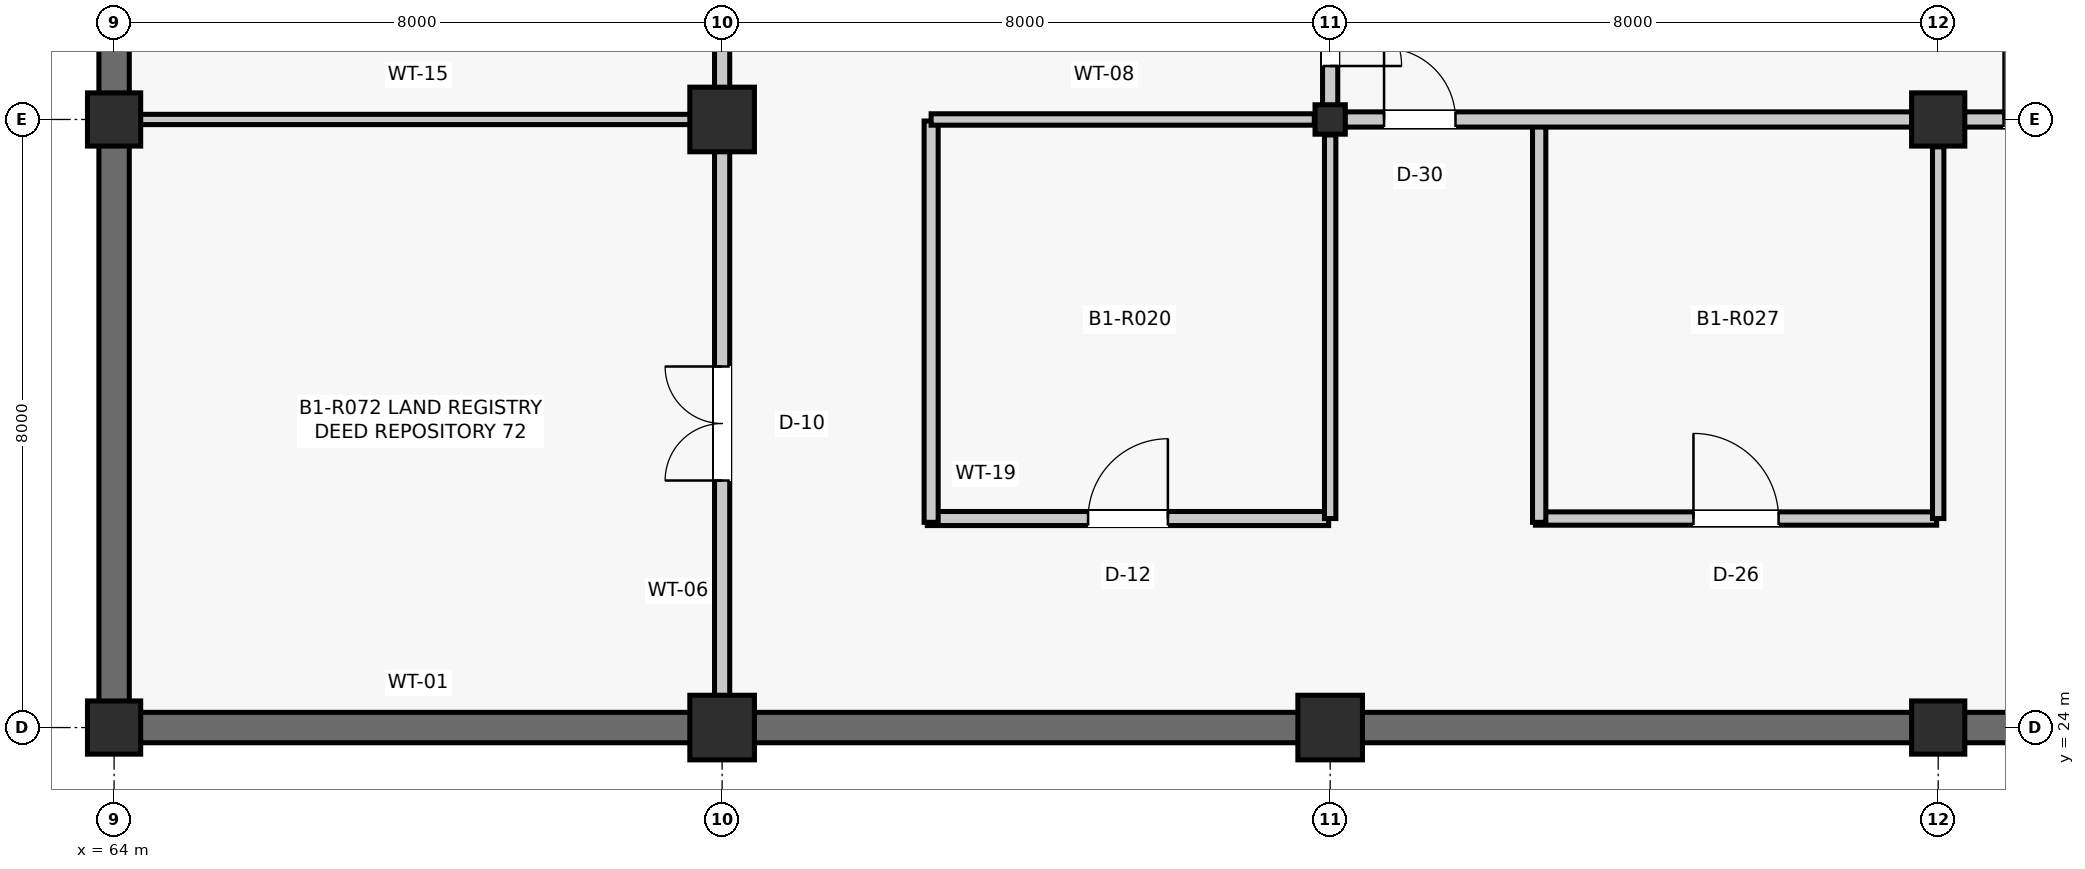
"""IFC4 building model, lengths in metres.
Left out: names, types, materials, properties, quantities, classifications, styles, units other than length and angle.
Written with IfcOpenShell. Run it as: python <this file> out.ifc"""

import sys

from ifc_helpers import new_model, si_unit, direction, frame, frame_2d, origin, origin_2d, place, context, subcontext, project, spatial, rectangle, i_section, extrude, element, fill, save


model = new_model("IFC4")
c1 = context("Model", 3, precision=1e-05, world=origin(), true_north=direction((0.0, 1.0)))
c2 = subcontext(c1, "Body", "Model", "MODEL_VIEW")
j1 = project(units=[si_unit("LENGTHUNIT", "METRE"), si_unit("PLANEANGLEUNIT", "RADIAN")], contexts=[c1])
p1 = place(None, origin())
s1 = spatial("IfcSite", under=j1, at=p1, CompositionType="ELEMENT")
p2 = place(p1, origin())
s2 = spatial("IfcBuilding", under=s1, at=p2, CompositionType="ELEMENT")
p3 = place(p2, frame((0.0, 0.0, -4.29)))
s3 = spatial("IfcBuildingStorey", under=s2, at=p3, CompositionType="ELEMENT", Elevation=-4.29)
for number, where, z_axis, x_axis in (
    (1, (64.0, 24.0, 0.0), (0.0, 0.0, 1.0), (1.0, 0.0, 0.0)),
    (2, (64.0, 32.0, 0.0), (0.0, 0.0, 1.0), (1.0, 0.0, 0.0)),
):
    element("IfcColumn", number, at=place(p3, frame(where, z_axis=z_axis, x_axis=x_axis)), inside=s3, PredefinedType="COLUMN", context=c2, shape_type="SweptSolid", body=[
        extrude(rectangle(XDim=0.7, YDim=0.7, at=origin_2d()), origin(), (0.0, 0.0, 1.0), 4.29),
    ])
for number, where, z_axis, x_axis in (
    (3, (72.0, 24.0, 0.0), (0.0, 0.0, 1.0), (1.0, 0.0, 0.0)),
    (4, (72.0, 32.0, 0.0), (0.0, 0.0, 1.0), (1.0, 0.0, 0.0)),
    (5, (80.0, 24.0, 0.0), (0.0, 0.0, 1.0), (1.0, 0.0, 0.0)),
):
    element("IfcColumn", number, at=place(p3, frame(where, z_axis=z_axis, x_axis=x_axis)), inside=s3, PredefinedType="COLUMN", context=c2, shape_type="SweptSolid", body=[
        extrude(rectangle(XDim=0.85, YDim=0.85, at=origin_2d()), origin(), (0.0, 0.0, 1.0), 4.29),
    ])
p4 = place(p3, frame((80.0, 32.0, 0.0), z_axis=(0.0, 0.0, 1.0), x_axis=(1.0, 0.0, 0.0)))
e6 = element("IfcColumn", 6, at=p4, inside=s3, PredefinedType="COLUMN", context=c2, shape_type="SweptSolid", body=[
    extrude(i_section(OverallWidth=0.398, OverallDepth=0.387, WebThickness=0.021, FlangeThickness=0.033, FilletRadius=0.015, at=origin_2d()), origin(), (0.0, 0.0, 1.0), 4.29),
])
for number, where, z_axis, x_axis in (
    (7, (88.0, 24.0, 0.0), (0.0, 0.0, 1.0), (1.0, 0.0, 0.0)),
    (8, (88.0, 32.0, 0.0), (0.0, 0.0, 1.0), (1.0, 0.0, 0.0)),
):
    element("IfcColumn", number, at=place(p3, frame(where, z_axis=z_axis, x_axis=x_axis)), inside=s3, PredefinedType="COLUMN", context=c2, shape_type="SweptSolid", body=[
        extrude(rectangle(XDim=0.7, YDim=0.7, at=origin_2d()), origin(), (0.0, 0.0, 1.0), 4.29),
    ])
p5 = place(p3, frame((64.335, 24.0, 0.0), z_axis=(0.0, 0.0, 1.0), x_axis=(1.0, 0.0, 0.0)))
e9 = element("IfcWall", 9, at=p5, inside=s3, PredefinedType="SHEAR", context=c2, shape_type="SweptSolid", body=[
    extrude(rectangle(XDim=7.255, YDim=0.4, at=frame_2d((3.627, 0.0))), origin(), (0.0, 0.0, 1.0), 3.401),
])
p6 = place(p3, frame((64.0, 24.335, 0.0), z_axis=(0.0, 0.0, 1.0), x_axis=(0.0, 1.0, 0.0)))
e10 = element("IfcWall", 10, at=p6, inside=s3, PredefinedType="SHEAR", context=c2, shape_type="SweptSolid", body=[
    extrude(rectangle(XDim=7.33, YDim=0.4, at=frame_2d((3.665, 0.0))), origin(), (0.0, 0.0, 1.0), 3.468),
])
p7 = place(p3, frame((64.0, 32.335, 0.0), z_axis=(0.0, 0.0, 1.0), x_axis=(0.0, 1.0, 0.0)))
e11 = element("IfcWall", 11, at=p7, inside=s3, PredefinedType="SHEAR", context=c2, shape_type="SweptSolid", body=[
    extrude(rectangle(XDim=7.33, YDim=0.4, at=frame_2d((3.665, 0.0))), origin(), (0.0, 0.0, 1.0), 3.4),
])
p8 = place(p3, frame((72.41, 24.0, 0.0), z_axis=(0.0, 0.0, 1.0), x_axis=(1.0, 0.0, 0.0)))
e12 = element("IfcWall", 12, at=p8, inside=s3, PredefinedType="SHEAR", context=c2, shape_type="SweptSolid", body=[
    extrude(rectangle(XDim=7.18, YDim=0.4, at=frame_2d((3.59, 0.0))), origin(), (0.0, 0.0, 1.0), 3.324),
])
p9 = place(p3, frame((80.41, 24.0, 0.0), z_axis=(0.0, 0.0, 1.0), x_axis=(1.0, 0.0, 0.0)))
e13 = element("IfcWall", 13, at=p9, inside=s3, PredefinedType="SHEAR", context=c2, shape_type="SweptSolid", body=[
    extrude(rectangle(XDim=7.255, YDim=0.4, at=frame_2d((3.627, 0.0))), origin(), (0.0, 0.0, 1.0), 3.4),
])
p10 = place(p3, frame((88.335, 24.0, 0.0), z_axis=(0.0, 0.0, 1.0), x_axis=(1.0, 0.0, 0.0)))
e14 = element("IfcWall", 14, at=p10, inside=s3, PredefinedType="SHEAR", context=c2, shape_type="SweptSolid", body=[
    extrude(rectangle(XDim=7.481, YDim=0.4, at=frame_2d((3.74, 0.0))), origin(), (0.0, 0.0, 1.0), 3.333),
])
p11 = place(p3, frame((74.7, 26.75, 0.0), z_axis=(0.0, 0.0, 1.0), x_axis=(1.0, 0.0, 0.0)))
e15 = element("IfcWall", 15, at=p11, inside=s3, PredefinedType="PARTITIONING", context=c2, shape_type="SweptSolid", body=[
    extrude(rectangle(XDim=5.28, YDim=0.185, at=frame_2d((2.64, 0.0))), origin(), (0.0, 0.0, 1.0), 3.402),
])
p12 = place(p11, frame((2.115, 0.0, 0.0)))
e16 = element("IfcOpeningElement", 16, at=p12, cuts=e15, PredefinedType="OPENING", context=c2, shape_type="SweptSolid", body=[
    extrude(rectangle(XDim=1.05, YDim=2.15, at=frame_2d((0.525, 1.075))), frame((0.0, 0.103, 0.0), z_axis=(0.0, -1.0, 0.0), x_axis=(1.0, 0.0, 0.0)), (0.0, 0.0, 1.0), 0.205),
])
p13 = place(p3, frame((74.75, 26.7, 0.0), z_axis=(0.0, 0.0, 1.0), x_axis=(0.0, 1.0, 0.0)))
e17 = element("IfcWall", 17, at=p13, inside=s3, PredefinedType="PARTITIONING", context=c2, shape_type="SweptSolid", body=[
    extrude(rectangle(XDim=5.28, YDim=0.185, at=frame_2d((2.64, 0.0))), origin(), (0.0, 0.0, 1.0), 3.393),
])
p14 = place(p3, frame((74.75, 32.0, 0.0), z_axis=(0.0, 0.0, 1.0), x_axis=(1.0, 0.0, 0.0)))
e18 = element("IfcWall", 18, at=p14, inside=s3, PredefinedType="PARTITIONING", context=c2, shape_type="SweptSolid", body=[
    extrude(rectangle(XDim=5.041, YDim=0.15, at=frame_2d((2.521, 0.0))), origin(), (0.0, 0.0, 1.0), 3.393),
])
p15 = place(p3, frame((80.0, 26.75, 0.0), z_axis=(0.0, 0.0, 1.0), x_axis=(0.0, 1.0, 0.0)))
e19 = element("IfcWall", 19, at=p15, inside=s3, PredefinedType="PARTITIONING", context=c2, shape_type="SweptSolid", body=[
    extrude(rectangle(XDim=5.046, YDim=0.15, at=frame_2d((2.523, 0.0))), origin(), (0.0, 0.0, 1.0), 3.402),
])
p16 = place(p3, frame((82.7, 26.75, 0.0), z_axis=(0.0, 0.0, 1.0), x_axis=(1.0, 0.0, 0.0)))
e20 = element("IfcWall", 20, at=p16, inside=s3, PredefinedType="PARTITIONING", context=c2, shape_type="SweptSolid", body=[
    extrude(rectangle(XDim=5.28, YDim=0.175, at=frame_2d((2.64, 0.0))), origin(), (0.0, 0.0, 1.0), 3.394),
])
p17 = place(p16, frame((2.08, 0.0, 0.0)))
e21 = element("IfcOpeningElement", 21, at=p17, cuts=e20, PredefinedType="OPENING", context=c2, shape_type="SweptSolid", body=[
    extrude(rectangle(XDim=1.12, YDim=2.22, at=frame_2d((0.56, 1.11))), frame((0.0, 0.097, 0.0), z_axis=(0.0, -1.0, 0.0), x_axis=(1.0, 0.0, 0.0)), (0.0, 0.0, 1.0), 0.195),
])
p18 = place(p3, frame((82.75, 26.7, 0.0), z_axis=(0.0, 0.0, 1.0), x_axis=(0.0, 1.0, 0.0)))
e22 = element("IfcWall", 22, at=p18, inside=s3, PredefinedType="PARTITIONING", context=c2, shape_type="SweptSolid", body=[
    extrude(rectangle(XDim=5.28, YDim=0.175, at=frame_2d((2.64, 0.0))), origin(), (0.0, 0.0, 1.0), 3.326),
])
p19 = place(p3, frame((88.0, 26.75, 0.0), z_axis=(0.0, 0.0, 1.0), x_axis=(0.0, 1.0, 0.0)))
e23 = element("IfcWall", 23, at=p19, inside=s3, PredefinedType="PARTITIONING", context=c2, shape_type="SweptSolid", body=[
    extrude(rectangle(XDim=4.89, YDim=0.15, at=frame_2d((2.445, 0.0))), origin(), (0.0, 0.0, 1.0), 3.394),
])
p20 = place(p3, frame((72.0, 24.415, 0.0), z_axis=(0.0, 0.0, 1.0), x_axis=(0.0, 1.0, 0.0)))
e24 = element("IfcWall", 24, at=p20, inside=s3, PredefinedType="PARTITIONING", context=c2, shape_type="SweptSolid", body=[
    extrude(rectangle(XDim=7.17, YDim=0.2, at=frame_2d((3.585, 0.0))), origin(), (0.0, 0.0, 1.0), 3.393),
])
p21 = place(p20, frame((2.835, 0.0, 0.0)))
e25 = element("IfcOpeningElement", 25, at=p21, cuts=e24, PredefinedType="OPENING", context=c2, shape_type="SweptSolid", body=[
    extrude(rectangle(XDim=1.5, YDim=2.25, at=frame_2d((0.75, 1.125))), frame((0.0, 0.11, 0.0), z_axis=(0.0, -1.0, 0.0), x_axis=(1.0, 0.0, 0.0)), (0.0, 0.0, 1.0), 0.22),
])
p22 = place(p3, frame((64.34, 32.0, 0.0), z_axis=(0.0, 0.0, 1.0), x_axis=(1.0, 0.0, 0.0)))
e26 = element("IfcWall", 26, at=p22, inside=s3, PredefinedType="PARTITIONING", context=c2, shape_type="SweptSolid", body=[
    extrude(rectangle(XDim=7.245, YDim=0.135, at=frame_2d((3.623, 0.0))), origin(), (0.0, 0.0, 1.0), 3.317),
])
p23 = place(p3, frame((72.0, 32.415, 0.0), z_axis=(0.0, 0.0, 1.0), x_axis=(0.0, 1.0, 0.0)))
e27 = element("IfcWall", 27, at=p23, inside=s3, PredefinedType="PARTITIONING", context=c2, shape_type="SweptSolid", body=[
    extrude(rectangle(XDim=7.17, YDim=0.2, at=frame_2d((3.585, 0.0))), origin(), (0.0, 0.0, 1.0), 3.402),
])
p24 = place(p23, frame((2.835, 0.0, 0.0)))
e28 = element("IfcOpeningElement", 28, at=p24, cuts=e27, PredefinedType="OPENING", context=c2, shape_type="SweptSolid", body=[
    extrude(rectangle(XDim=1.5, YDim=2.25, at=frame_2d((0.75, 1.125))), frame((0.0, 0.11, 0.0), z_axis=(0.0, -1.0, 0.0), x_axis=(1.0, 0.0, 0.0)), (0.0, 0.0, 1.0), 0.22),
])
p25 = place(p3, frame((80.0, 32.184, 0.0), z_axis=(0.0, 0.0, 1.0), x_axis=(0.0, 1.0, 0.0)))
e29 = element("IfcWall", 29, at=p25, inside=s3, PredefinedType="PARTITIONING", context=c2, shape_type="SweptSolid", body=[
    extrude(rectangle(XDim=7.633, YDim=0.2, at=frame_2d((3.816, 0.0))), origin(), (0.0, 0.0, 1.0), 3.394),
])
p26 = place(p25, frame((0.52, 0.0, 0.0)))
e30 = element("IfcOpeningElement", 30, at=p26, cuts=e29, PredefinedType="OPENING", context=c2, shape_type="SweptSolid", body=[
    extrude(rectangle(XDim=0.94, YDim=2.12, at=frame_2d((0.47, 1.06))), frame((0.0, 0.11, 0.0), z_axis=(0.0, -1.0, 0.0), x_axis=(1.0, 0.0, 0.0)), (0.0, 0.0, 1.0), 0.22),
])
p27 = place(p3, frame((80.189, 32.0, 0.0), z_axis=(0.0, 0.0, 1.0), x_axis=(1.0, 0.0, 0.0)))
e31 = element("IfcWall", 31, at=p27, inside=s3, PredefinedType="PARTITIONING", context=c2, shape_type="SweptSolid", body=[
    extrude(rectangle(XDim=7.471, YDim=0.2, at=frame_2d((3.735, 0.0))), origin(), (0.0, 0.0, 1.0), 3.326),
])
p28 = place(p27, frame((0.52, 0.0, 0.0)))
e32 = element("IfcOpeningElement", 32, at=p28, cuts=e31, PredefinedType="OPENING", context=c2, shape_type="SweptSolid", body=[
    extrude(rectangle(XDim=0.94, YDim=2.12, at=frame_2d((0.47, 1.06))), frame((0.0, 0.11, 0.0), z_axis=(0.0, -1.0, 0.0), x_axis=(1.0, 0.0, 0.0)), (0.0, 0.0, 1.0), 0.22),
])
p29 = place(p3, frame((88.34, 32.0, 0.0), z_axis=(0.0, 0.0, 1.0), x_axis=(1.0, 0.0, 0.0)))
e33 = element("IfcWall", 33, at=p29, inside=s3, PredefinedType="PARTITIONING", context=c2, shape_type="SweptSolid", body=[
    extrude(rectangle(XDim=7.471, YDim=0.2, at=frame_2d((3.735, 0.0))), origin(), (0.0, 0.0, 1.0), 3.394),
])
p30 = place(p29, frame((0.52, 0.0, 0.0)))
e34 = element("IfcOpeningElement", 34, at=p30, cuts=e33, PredefinedType="OPENING", context=c2, shape_type="SweptSolid", body=[
    extrude(rectangle(XDim=0.94, YDim=2.12, at=frame_2d((0.47, 1.06))), frame((0.0, 0.11, 0.0), z_axis=(0.0, -1.0, 0.0), x_axis=(1.0, 0.0, 0.0)), (0.0, 0.0, 1.0), 0.22),
])
p31 = place(p12, origin())
e35 = element("IfcDoor", 35, at=p31, inside=s3, OperationType="SINGLE_SWING_RIGHT", PredefinedType="DOOR", context=c2, shape_type="SweptSolid", body=[
    extrude(rectangle(XDim=1.05, YDim=2.15, at=frame_2d((0.525, 1.075))), frame((0.0, 0.025, 0.0), z_axis=(0.0, -1.0, 0.0), x_axis=(1.0, 0.0, 0.0)), (0.0, 0.0, 1.0), 0.05),
])
fill(e16, e35)
p32 = place(p17, origin())
e36 = element("IfcDoor", 36, at=p32, inside=s3, OperationType="SINGLE_SWING_LEFT", PredefinedType="DOOR", context=c2, shape_type="SweptSolid", body=[
    extrude(rectangle(XDim=1.12, YDim=2.22, at=frame_2d((0.56, 1.11))), frame((0.0, 0.025, 0.0), z_axis=(0.0, -1.0, 0.0), x_axis=(1.0, 0.0, 0.0)), (0.0, 0.0, 1.0), 0.05),
])
fill(e21, e36)
p33 = place(p21, origin())
e37 = element("IfcDoor", 37, at=p33, inside=s3, OperationType="DOUBLE_DOOR_SINGLE_SWING", PredefinedType="DOOR", context=c2, shape_type="SweptSolid", body=[
    extrude(rectangle(XDim=1.5, YDim=2.25, at=frame_2d((0.75, 1.125))), frame((0.0, 0.025, 0.0), z_axis=(0.0, -1.0, 0.0), x_axis=(1.0, 0.0, 0.0)), (0.0, 0.0, 1.0), 0.05),
])
fill(e25, e37)
p34 = place(p26, frame((0.94, 0.0, 0.0), z_axis=(0.0, 0.0, 1.0), x_axis=(-1.0, 0.0, 0.0)))
e38 = element("IfcDoor", 38, at=p34, inside=s3, OperationType="SINGLE_SWING_LEFT", PredefinedType="DOOR", context=c2, shape_type="SweptSolid", body=[
    extrude(rectangle(XDim=0.94, YDim=2.12, at=frame_2d((0.47, 1.06))), frame((0.0, 0.025, 0.0), z_axis=(0.0, -1.0, 0.0), x_axis=(1.0, 0.0, 0.0)), (0.0, 0.0, 1.0), 0.05),
])
fill(e30, e38)
p35 = place(p28, origin())
e39 = element("IfcDoor", 39, at=p35, inside=s3, OperationType="SINGLE_SWING_LEFT", PredefinedType="DOOR", context=c2, shape_type="SweptSolid", body=[
    extrude(rectangle(XDim=0.94, YDim=2.12, at=frame_2d((0.47, 1.06))), frame((0.0, 0.025, 0.0), z_axis=(0.0, -1.0, 0.0), x_axis=(1.0, 0.0, 0.0)), (0.0, 0.0, 1.0), 0.05),
])
fill(e32, e39)
p36 = place(p30, origin())
e40 = element("IfcDoor", 40, at=p36, inside=s3, OperationType="SINGLE_SWING_LEFT", PredefinedType="DOOR", context=c2, shape_type="SweptSolid", body=[
    extrude(rectangle(XDim=0.94, YDim=2.12, at=frame_2d((0.47, 1.06))), frame((0.0, 0.025, 0.0), z_axis=(0.0, -1.0, 0.0), x_axis=(1.0, 0.0, 0.0)), (0.0, 0.0, 1.0), 0.05),
])
fill(e34, e40)
save(model, sys.argv[1])
